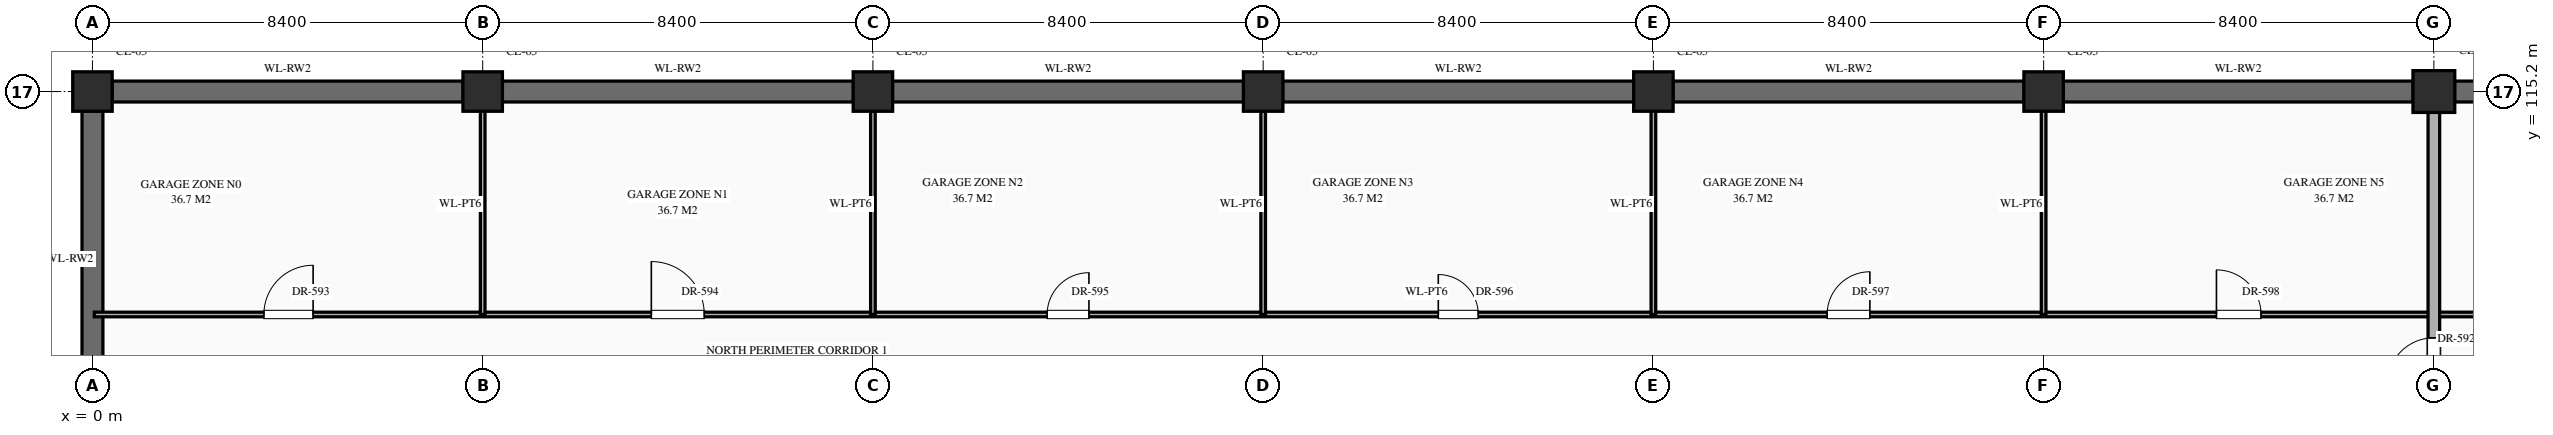
"""IFC4 building model, lengths in metres.
Left out: names, types, materials, properties, quantities, classifications, styles, units other than length and angle.
Written with IfcOpenShell. Run it as: python <this file> out.ifc"""

import sys

from ifc_helpers import new_model, si_unit, direction, frame, frame_2d, origin, origin_2d, place, context, subcontext, project, spatial, rectangle, extrude, element, fill, save


model = new_model("IFC4")
c1 = context("Model", 3, precision=1e-05, world=origin(), true_north=direction((0.0, 1.0)))
c2 = subcontext(c1, "Body", "Model", "MODEL_VIEW")
j1 = project(units=[si_unit("LENGTHUNIT", "METRE"), si_unit("PLANEANGLEUNIT", "RADIAN")], contexts=[c1])
p1 = place(None, origin())
s1 = spatial("IfcSite", under=j1, at=p1, CompositionType="ELEMENT")
p2 = place(p1, origin())
s2 = spatial("IfcBuilding", under=s1, at=p2, CompositionType="ELEMENT")
p3 = place(p2, frame((0.0, 0.0, -5.4)))
s3 = spatial("IfcBuildingStorey", under=s2, at=p3, CompositionType="ELEMENT", Elevation=-5.4)
for number, where, z_axis, x_axis in (
    (1, (0.0, 115.2, 0.0), (0.0, 0.0, 1.0), (1.0, 0.0, 0.0)),
    (2, (8.4, 115.2, 0.0), (0.0, 0.0, 1.0), (1.0, 0.0, 0.0)),
    (3, (16.8, 115.2, 0.0), (0.0, 0.0, 1.0), (1.0, 0.0, 0.0)),
    (4, (25.2, 115.2, 0.0), (0.0, 0.0, 1.0), (1.0, 0.0, 0.0)),
    (5, (33.6, 115.2, 0.0), (0.0, 0.0, 1.0), (1.0, 0.0, 0.0)),
    (6, (42.0, 115.2, 0.0), (0.0, 0.0, 1.0), (1.0, 0.0, 0.0)),
):
    element("IfcColumn", number, at=place(p3, frame(where, z_axis=z_axis, x_axis=x_axis)), inside=s3, PredefinedType="COLUMN", context=c2, shape_type="SweptSolid", body=[
        extrude(rectangle(XDim=0.85, YDim=0.85, at=origin_2d()), origin(), (0.0, 0.0, 1.0), 5.4),
    ])
p4 = place(p3, frame((50.4, 115.2, 0.0), z_axis=(0.0, 0.0, 1.0), x_axis=(1.0, 0.0, 0.0)))
e7 = element("IfcColumn", 7, at=p4, inside=s3, PredefinedType="COLUMN", context=c2, shape_type="SweptSolid", body=[
    extrude(rectangle(XDim=0.9, YDim=0.9, at=origin_2d()), origin(), (0.0, 0.0, 1.0), 5.4),
])
p5 = place(p3, frame((0.42, 115.2, 0.0), z_axis=(0.0, 0.0, 1.0), x_axis=(1.0, 0.0, 0.0)))
e8 = element("IfcWall", 8, at=p5, inside=s3, PredefinedType="USERDEFINED", context=c2, shape_type="SweptSolid", body=[
    extrude(rectangle(XDim=7.56, YDim=0.45, at=frame_2d((3.78, 0.0))), origin(), (0.0, 0.0, 1.0), 4.98),
])
p6 = place(p3, frame((0.0, 108.42, 0.0), z_axis=(0.0, 0.0, 1.0), x_axis=(0.0, 1.0, 0.0)))
e9 = element("IfcWall", 9, at=p6, inside=s3, PredefinedType="USERDEFINED", context=c2, shape_type="SweptSolid", body=[
    extrude(rectangle(XDim=6.36, YDim=0.45, at=frame_2d((3.18, 0.0))), origin(), (0.0, 0.0, 1.0), 4.98),
])
p7 = place(p3, frame((8.82, 115.2, 0.0), z_axis=(0.0, 0.0, 1.0), x_axis=(1.0, 0.0, 0.0)))
e10 = element("IfcWall", 10, at=p7, inside=s3, PredefinedType="USERDEFINED", context=c2, shape_type="SweptSolid", body=[
    extrude(rectangle(XDim=7.56, YDim=0.45, at=frame_2d((3.78, 0.0))), origin(), (0.0, 0.0, 1.0), 4.98),
])
p8 = place(p3, frame((17.22, 115.2, 0.0), z_axis=(0.0, 0.0, 1.0), x_axis=(1.0, 0.0, 0.0)))
e11 = element("IfcWall", 11, at=p8, inside=s3, PredefinedType="USERDEFINED", context=c2, shape_type="SweptSolid", body=[
    extrude(rectangle(XDim=7.56, YDim=0.45, at=frame_2d((3.78, 0.0))), origin(), (0.0, 0.0, 1.0), 4.98),
])
p9 = place(p3, frame((25.62, 115.2, 0.0), z_axis=(0.0, 0.0, 1.0), x_axis=(1.0, 0.0, 0.0)))
e12 = element("IfcWall", 12, at=p9, inside=s3, PredefinedType="USERDEFINED", context=c2, shape_type="SweptSolid", body=[
    extrude(rectangle(XDim=7.56, YDim=0.45, at=frame_2d((3.78, 0.0))), origin(), (0.0, 0.0, 1.0), 4.98),
])
p10 = place(p3, frame((34.02, 115.2, 0.0), z_axis=(0.0, 0.0, 1.0), x_axis=(1.0, 0.0, 0.0)))
e13 = element("IfcWall", 13, at=p10, inside=s3, PredefinedType="USERDEFINED", context=c2, shape_type="SweptSolid", body=[
    extrude(rectangle(XDim=7.56, YDim=0.45, at=frame_2d((3.78, 0.0))), origin(), (0.0, 0.0, 1.0), 4.98),
])
p11 = place(p3, frame((42.42, 115.2, 0.0), z_axis=(0.0, 0.0, 1.0), x_axis=(1.0, 0.0, 0.0)))
e14 = element("IfcWall", 14, at=p11, inside=s3, PredefinedType="USERDEFINED", context=c2, shape_type="SweptSolid", body=[
    extrude(rectangle(XDim=7.535, YDim=0.45, at=frame_2d((3.768, 0.0))), origin(), (0.0, 0.0, 1.0), 4.98),
])
p12 = place(p3, frame((50.845, 115.2, 0.0), z_axis=(0.0, 0.0, 1.0), x_axis=(1.0, 0.0, 0.0)))
e15 = element("IfcWall", 15, at=p12, inside=s3, PredefinedType="USERDEFINED", context=c2, shape_type="SweptSolid", body=[
    extrude(rectangle(XDim=7.51, YDim=0.45, at=frame_2d((3.755, 0.0))), origin(), (0.0, 0.0, 1.0), 5.1),
])
p13 = place(p3, frame((0.04, 110.4, 0.0), z_axis=(0.0, 0.0, 1.0), x_axis=(1.0, 0.0, 0.0)))
e16 = element("IfcWall", 16, at=p13, inside=s3, PredefinedType="STANDARD", context=c2, shape_type="SweptSolid", body=[
    extrude(rectangle(XDim=167.92, YDim=0.1, at=frame_2d((83.96, 0.0))), origin(), (0.0, 0.0, 1.0), 5.1),
])
p14 = place(p13, frame((3.65, 0.0, 0.0)))
e17 = element("IfcOpeningElement", 17, at=p14, cuts=e16, PredefinedType="OPENING", context=c2, shape_type="SweptSolid", body=[
    extrude(rectangle(XDim=1.06, YDim=2.4, at=frame_2d((0.53, 1.2))), frame((0.0, 0.062, 0.0), z_axis=(0.0, -1.0, 0.0), x_axis=(1.0, 0.0, 0.0)), (0.0, 0.0, 1.0), 0.124),
])
p15 = place(p13, frame((11.99, 0.0, 0.0)))
e18 = element("IfcOpeningElement", 18, at=p15, cuts=e16, PredefinedType="OPENING", context=c2, shape_type="SweptSolid", body=[
    extrude(rectangle(XDim=1.14, YDim=2.4, at=frame_2d((0.57, 1.2))), frame((0.0, 0.062, 0.0), z_axis=(0.0, -1.0, 0.0), x_axis=(1.0, 0.0, 0.0)), (0.0, 0.0, 1.0), 0.124),
])
p16 = place(p13, frame((20.51, 0.0, 0.0)))
e19 = element("IfcOpeningElement", 19, at=p16, cuts=e16, PredefinedType="OPENING", context=c2, shape_type="SweptSolid", body=[
    extrude(rectangle(XDim=0.9, YDim=2.15, at=frame_2d((0.45, 1.075))), frame((0.0, 0.062, 0.0), z_axis=(0.0, -1.0, 0.0), x_axis=(1.0, 0.0, 0.0)), (0.0, 0.0, 1.0), 0.124),
])
p17 = place(p13, frame((28.93, 0.0, 0.0)))
e20 = element("IfcOpeningElement", 20, at=p17, cuts=e16, PredefinedType="OPENING", context=c2, shape_type="SweptSolid", body=[
    extrude(rectangle(XDim=0.86, YDim=2.1, at=frame_2d((0.43, 1.05))), frame((0.0, 0.062, 0.0), z_axis=(0.0, -1.0, 0.0), x_axis=(1.0, 0.0, 0.0)), (0.0, 0.0, 1.0), 0.124),
])
p18 = place(p13, frame((37.3, 0.0, 0.0)))
e21 = element("IfcOpeningElement", 21, at=p18, cuts=e16, PredefinedType="OPENING", context=c2, shape_type="SweptSolid", body=[
    extrude(rectangle(XDim=0.92, YDim=2.15, at=frame_2d((0.46, 1.075))), frame((0.0, 0.062, 0.0), z_axis=(0.0, -1.0, 0.0), x_axis=(1.0, 0.0, 0.0)), (0.0, 0.0, 1.0), 0.124),
])
p19 = place(p13, frame((45.68, 0.0, 0.0)))
e22 = element("IfcOpeningElement", 22, at=p19, cuts=e16, PredefinedType="OPENING", context=c2, shape_type="SweptSolid", body=[
    extrude(rectangle(XDim=0.96, YDim=2.2, at=frame_2d((0.48, 1.1))), frame((0.0, 0.062, 0.0), z_axis=(0.0, -1.0, 0.0), x_axis=(1.0, 0.0, 0.0)), (0.0, 0.0, 1.0), 0.124),
])
p20 = place(p13, frame((54.04, 0.0, 0.0)))
e23 = element("IfcOpeningElement", 23, at=p20, cuts=e16, PredefinedType="OPENING", context=c2, shape_type="SweptSolid", body=[
    extrude(rectangle(XDim=1.04, YDim=2.2, at=frame_2d((0.52, 1.1))), frame((0.0, 0.062, 0.0), z_axis=(0.0, -1.0, 0.0), x_axis=(1.0, 0.0, 0.0)), (0.0, 0.0, 1.0), 0.124),
])
p21 = place(p13, frame((62.42, 0.0, 0.0)))
e24 = element("IfcOpeningElement", 24, at=p21, cuts=e16, PredefinedType="OPENING", context=c2, shape_type="SweptSolid", body=[
    extrude(rectangle(XDim=1.08, YDim=2.25, at=frame_2d((0.54, 1.125))), frame((0.0, 0.062, 0.0), z_axis=(0.0, -1.0, 0.0), x_axis=(1.0, 0.0, 0.0)), (0.0, 0.0, 1.0), 0.124),
])
p22 = place(p13, frame((70.8, 0.0, 0.0)))
e25 = element("IfcOpeningElement", 25, at=p22, cuts=e16, PredefinedType="OPENING", context=c2, shape_type="SweptSolid", body=[
    extrude(rectangle(XDim=1.12, YDim=2.25, at=frame_2d((0.56, 1.125))), frame((0.0, 0.062, 0.0), z_axis=(0.0, -1.0, 0.0), x_axis=(1.0, 0.0, 0.0)), (0.0, 0.0, 1.0), 0.124),
])
p23 = place(p13, frame((79.18, 0.0, 0.0)))
e26 = element("IfcOpeningElement", 26, at=p23, cuts=e16, PredefinedType="OPENING", context=c2, shape_type="SweptSolid", body=[
    extrude(rectangle(XDim=1.16, YDim=2.3, at=frame_2d((0.58, 1.15))), frame((0.0, 0.062, 0.0), z_axis=(0.0, -1.0, 0.0), x_axis=(1.0, 0.0, 0.0)), (0.0, 0.0, 1.0), 0.124),
])
p24 = place(p13, frame((87.54, 0.0, 0.0)))
e27 = element("IfcOpeningElement", 27, at=p24, cuts=e16, PredefinedType="OPENING", context=c2, shape_type="SweptSolid", body=[
    extrude(rectangle(XDim=1.24, YDim=2.3, at=frame_2d((0.62, 1.15))), frame((0.0, 0.062, 0.0), z_axis=(0.0, -1.0, 0.0), x_axis=(1.0, 0.0, 0.0)), (0.0, 0.0, 1.0), 0.124),
])
p25 = place(p13, frame((95.92, 0.0, 0.0)))
e28 = element("IfcOpeningElement", 28, at=p25, cuts=e16, PredefinedType="OPENING", context=c2, shape_type="SweptSolid", body=[
    extrude(rectangle(XDim=1.28, YDim=2.35, at=frame_2d((0.64, 1.175))), frame((0.0, 0.062, 0.0), z_axis=(0.0, -1.0, 0.0), x_axis=(1.0, 0.0, 0.0)), (0.0, 0.0, 1.0), 0.124),
])
p26 = place(p13, frame((104.49, 0.0, 0.0)))
e29 = element("IfcOpeningElement", 29, at=p26, cuts=e16, PredefinedType="OPENING", context=c2, shape_type="SweptSolid", body=[
    extrude(rectangle(XDim=0.94, YDim=2.3, at=frame_2d((0.47, 1.15))), frame((0.0, 0.062, 0.0), z_axis=(0.0, -1.0, 0.0), x_axis=(1.0, 0.0, 0.0)), (0.0, 0.0, 1.0), 0.124),
])
p27 = place(p13, frame((112.87, 0.0, 0.0)))
e30 = element("IfcOpeningElement", 30, at=p27, cuts=e16, PredefinedType="OPENING", context=c2, shape_type="SweptSolid", body=[
    extrude(rectangle(XDim=0.98, YDim=2.35, at=frame_2d((0.49, 1.175))), frame((0.0, 0.062, 0.0), z_axis=(0.0, -1.0, 0.0), x_axis=(1.0, 0.0, 0.0)), (0.0, 0.0, 1.0), 0.124),
])
p28 = place(p13, frame((121.25, 0.0, 0.0)))
e31 = element("IfcOpeningElement", 31, at=p28, cuts=e16, PredefinedType="OPENING", context=c2, shape_type="SweptSolid", body=[
    extrude(rectangle(XDim=1.02, YDim=2.4, at=frame_2d((0.51, 1.2))), frame((0.0, 0.062, 0.0), z_axis=(0.0, -1.0, 0.0), x_axis=(1.0, 0.0, 0.0)), (0.0, 0.0, 1.0), 0.124),
])
p29 = place(p13, frame((129.63, 0.0, 0.0)))
e32 = element("IfcOpeningElement", 32, at=p29, cuts=e16, PredefinedType="OPENING", context=c2, shape_type="SweptSolid", body=[
    extrude(rectangle(XDim=1.06, YDim=2.4, at=frame_2d((0.53, 1.2))), frame((0.0, 0.062, 0.0), z_axis=(0.0, -1.0, 0.0), x_axis=(1.0, 0.0, 0.0)), (0.0, 0.0, 1.0), 0.124),
])
p30 = place(p13, frame((137.99, 0.0, 0.0)))
e33 = element("IfcOpeningElement", 33, at=p30, cuts=e16, PredefinedType="OPENING", context=c2, shape_type="SweptSolid", body=[
    extrude(rectangle(XDim=1.14, YDim=2.4, at=frame_2d((0.57, 1.2))), frame((0.0, 0.062, 0.0), z_axis=(0.0, -1.0, 0.0), x_axis=(1.0, 0.0, 0.0)), (0.0, 0.0, 1.0), 0.124),
])
p31 = place(p13, frame((146.51, 0.0, 0.0)))
e34 = element("IfcOpeningElement", 34, at=p31, cuts=e16, PredefinedType="OPENING", context=c2, shape_type="SweptSolid", body=[
    extrude(rectangle(XDim=0.9, YDim=2.15, at=frame_2d((0.45, 1.075))), frame((0.0, 0.062, 0.0), z_axis=(0.0, -1.0, 0.0), x_axis=(1.0, 0.0, 0.0)), (0.0, 0.0, 1.0), 0.124),
])
p32 = place(p13, frame((154.93, 0.0, 0.0)))
e35 = element("IfcOpeningElement", 35, at=p32, cuts=e16, PredefinedType="OPENING", context=c2, shape_type="SweptSolid", body=[
    extrude(rectangle(XDim=0.86, YDim=2.1, at=frame_2d((0.43, 1.05))), frame((0.0, 0.062, 0.0), z_axis=(0.0, -1.0, 0.0), x_axis=(1.0, 0.0, 0.0)), (0.0, 0.0, 1.0), 0.124),
])
p33 = place(p13, frame((163.28, 0.0, 0.0)))
e36 = element("IfcOpeningElement", 36, at=p33, cuts=e16, PredefinedType="OPENING", context=c2, shape_type="SweptSolid", body=[
    extrude(rectangle(XDim=0.92, YDim=2.15, at=frame_2d((0.46, 1.075))), frame((0.0, 0.062, 0.0), z_axis=(0.0, -1.0, 0.0), x_axis=(1.0, 0.0, 0.0)), (0.0, 0.0, 1.0), 0.124),
])
for number, where, z_axis, x_axis in (
    (37, (8.4, 110.4, 0.0), (0.0, 0.0, 1.0), (0.0, 1.0, 0.0)),
    (38, (16.8, 110.4, 0.0), (0.0, 0.0, 1.0), (0.0, 1.0, 0.0)),
    (39, (25.2, 110.4, 0.0), (0.0, 0.0, 1.0), (0.0, 1.0, 0.0)),
    (40, (33.6, 110.4, 0.0), (0.0, 0.0, 1.0), (0.0, 1.0, 0.0)),
    (41, (42.0, 110.4, 0.0), (0.0, 0.0, 1.0), (0.0, 1.0, 0.0)),
):
    element("IfcWall", number, at=place(p3, frame(where, z_axis=z_axis, x_axis=x_axis)), inside=s3, PredefinedType="STANDARD", context=c2, shape_type="SweptSolid", body=[
        extrude(rectangle(XDim=4.76, YDim=0.1, at=frame_2d((2.38, 0.0))), origin(), (0.0, 0.0, 1.0), 4.23),
    ])
p34 = place(p3, frame((50.4, 108.0, 0.0), z_axis=(0.0, 0.0, 1.0), x_axis=(0.0, 1.0, 0.0)))
e42 = element("IfcWall", 42, at=p34, inside=s3, PredefinedType="STANDARD", context=c2, shape_type="SweptSolid", body=[
    extrude(rectangle(XDim=7.16, YDim=0.25, at=frame_2d((3.58, 0.0))), origin(), (0.0, 0.0, 1.0), 4.23),
])
p35 = place(p34, frame((0.897, 0.0, 0.0)))
e43 = element("IfcOpeningElement", 43, at=p35, cuts=e42, PredefinedType="OPENING", context=c2, shape_type="SweptSolid", body=[
    extrude(rectangle(XDim=1.0, YDim=2.2, at=frame_2d((0.5, 1.1))), frame((0.0, 0.137, 0.0), z_axis=(0.0, -1.0, 0.0), x_axis=(1.0, 0.0, 0.0)), (0.0, 0.0, 1.0), 0.274),
])
p36 = place(p35, origin())
e44 = element("IfcDoor", 44, at=p36, inside=s3, OperationType="SINGLE_SWING_LEFT", PredefinedType="DOOR", context=c2, shape_type="SweptSolid", body=[
    extrude(rectangle(XDim=1.0, YDim=2.2, at=frame_2d((0.5, 1.1))), frame((0.0, 0.025, 0.0), z_axis=(0.0, -1.0, 0.0), x_axis=(1.0, 0.0, 0.0)), (0.0, 0.0, 1.0), 0.05),
])
fill(e43, e44)
p37 = place(p14, origin())
e45 = element("IfcDoor", 45, at=p37, inside=s3, OperationType="SINGLE_SWING_RIGHT", PredefinedType="DOOR", context=c2, shape_type="SweptSolid", body=[
    extrude(rectangle(XDim=1.06, YDim=2.4, at=frame_2d((0.53, 1.2))), frame((0.0, 0.025, 0.0), z_axis=(0.0, -1.0, 0.0), x_axis=(1.0, 0.0, 0.0)), (0.0, 0.0, 1.0), 0.05),
])
fill(e17, e45)
p38 = place(p15, origin())
e46 = element("IfcDoor", 46, at=p38, inside=s3, OperationType="SINGLE_SWING_LEFT", PredefinedType="DOOR", context=c2, shape_type="SweptSolid", body=[
    extrude(rectangle(XDim=1.14, YDim=2.4, at=frame_2d((0.57, 1.2))), frame((0.0, 0.025, 0.0), z_axis=(0.0, -1.0, 0.0), x_axis=(1.0, 0.0, 0.0)), (0.0, 0.0, 1.0), 0.05),
])
fill(e18, e46)
p39 = place(p16, origin())
e47 = element("IfcDoor", 47, at=p39, inside=s3, OperationType="SINGLE_SWING_RIGHT", PredefinedType="DOOR", context=c2, shape_type="SweptSolid", body=[
    extrude(rectangle(XDim=0.9, YDim=2.15, at=frame_2d((0.45, 1.075))), frame((0.0, 0.025, 0.0), z_axis=(0.0, -1.0, 0.0), x_axis=(1.0, 0.0, 0.0)), (0.0, 0.0, 1.0), 0.05),
])
fill(e19, e47)
p40 = place(p17, origin())
e48 = element("IfcDoor", 48, at=p40, inside=s3, OperationType="SINGLE_SWING_LEFT", PredefinedType="DOOR", context=c2, shape_type="SweptSolid", body=[
    extrude(rectangle(XDim=0.86, YDim=2.1, at=frame_2d((0.43, 1.05))), frame((0.0, 0.025, 0.0), z_axis=(0.0, -1.0, 0.0), x_axis=(1.0, 0.0, 0.0)), (0.0, 0.0, 1.0), 0.05),
])
fill(e20, e48)
p41 = place(p18, origin())
e49 = element("IfcDoor", 49, at=p41, inside=s3, OperationType="SINGLE_SWING_RIGHT", PredefinedType="DOOR", context=c2, shape_type="SweptSolid", body=[
    extrude(rectangle(XDim=0.92, YDim=2.15, at=frame_2d((0.46, 1.075))), frame((0.0, 0.025, 0.0), z_axis=(0.0, -1.0, 0.0), x_axis=(1.0, 0.0, 0.0)), (0.0, 0.0, 1.0), 0.05),
])
fill(e21, e49)
p42 = place(p19, origin())
e50 = element("IfcDoor", 50, at=p42, inside=s3, OperationType="SINGLE_SWING_LEFT", PredefinedType="DOOR", context=c2, shape_type="SweptSolid", body=[
    extrude(rectangle(XDim=0.96, YDim=2.2, at=frame_2d((0.48, 1.1))), frame((0.0, 0.025, 0.0), z_axis=(0.0, -1.0, 0.0), x_axis=(1.0, 0.0, 0.0)), (0.0, 0.0, 1.0), 0.05),
])
fill(e22, e50)
save(model, sys.argv[1])
